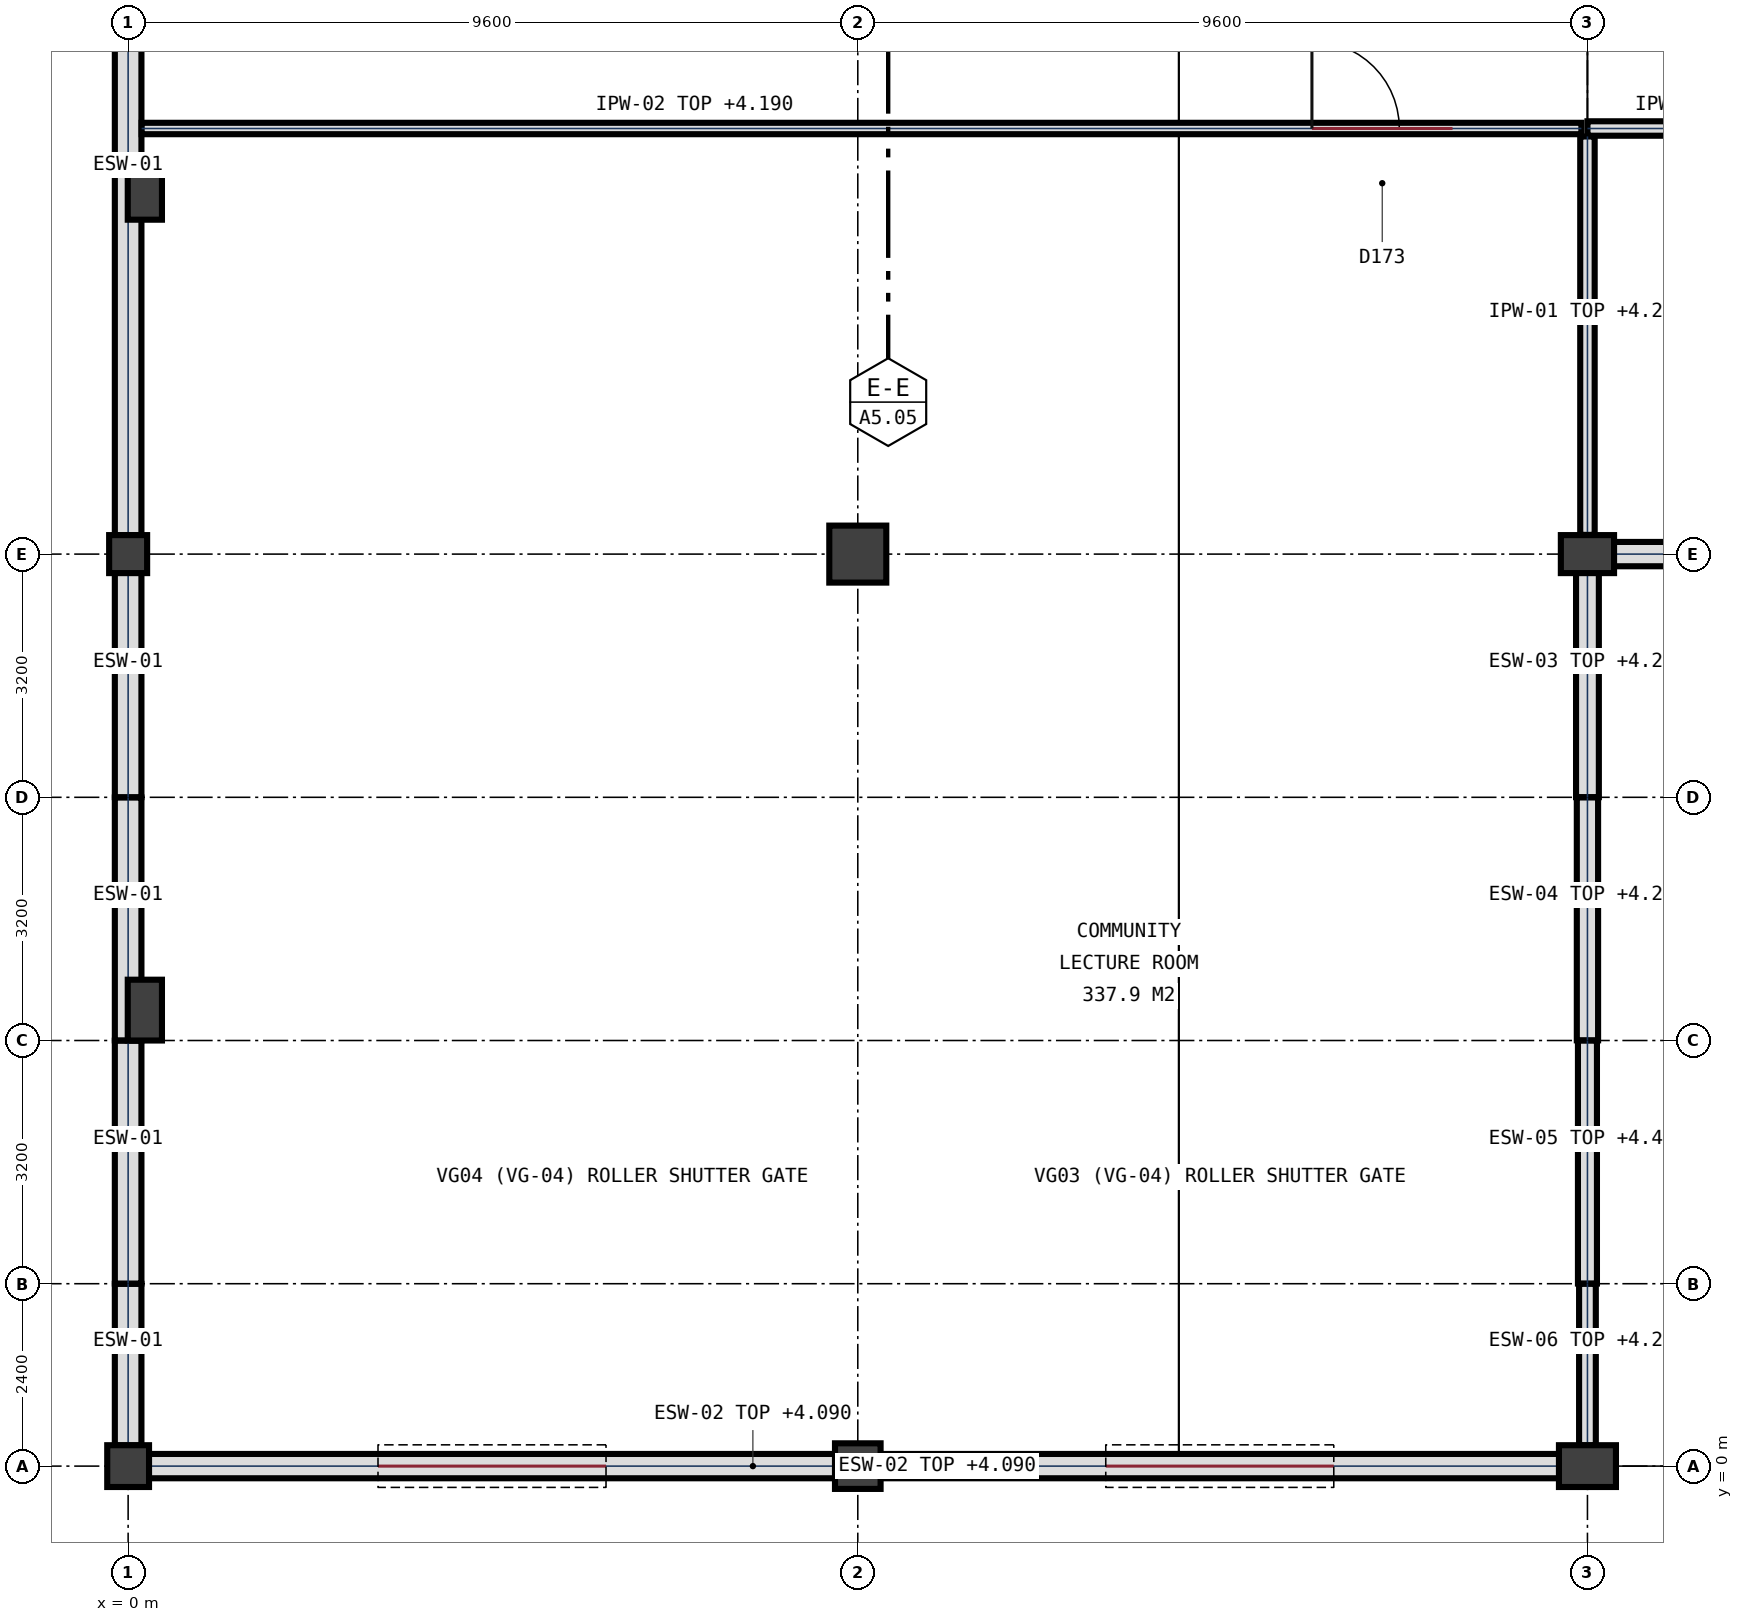
"""IFC4 building model, lengths in metres.
Left out: names, types, materials, properties, quantities, classifications, styles, units other than length and angle.
Written with IfcOpenShell. Run it as: python <this file> out.ifc"""

import sys

from ifc_helpers import new_model, si_unit, direction, frame, frame_2d, origin, origin_with_axes, origin_2d, place, context, subcontext, project, spatial, rectangle, circle, extrude, element, fill, save


model = new_model("IFC4")
c1 = context("Model", 3, precision=1e-05, world=origin(), true_north=direction((0.0, 1.0)))
c2 = subcontext(c1, "Body", "Model", "MODEL_VIEW")
j1 = project(units=[si_unit("LENGTHUNIT", "METRE"), si_unit("PLANEANGLEUNIT", "RADIAN")], contexts=[c1])
p1 = place(None, origin())
s1 = spatial("IfcSite", under=j1, at=p1, CompositionType="ELEMENT")
p2 = place(p1, origin())
s2 = spatial("IfcBuilding", under=s1, at=p2, CompositionType="ELEMENT")
p3 = place(p2, origin())
s3 = spatial("IfcBuildingStorey", under=s2, at=p3, CompositionType="ELEMENT", Elevation=0.0)
p4 = place(p3, origin_with_axes())
e1 = element("IfcColumn", 1, at=p4, inside=s3, PredefinedType="COLUMN", context=c2, shape_type="SweptSolid", body=[
    extrude(rectangle(XDim=0.55, YDim=0.55, at=origin_2d()), origin(), (0.0, 0.0, 1.0), 5.4),
])
p5 = place(p3, frame((0.0, 12.0, 0.0), z_axis=(0.0, 0.0, 1.0), x_axis=(1.0, 0.0, 0.0)))
e2 = element("IfcColumn", 2, at=p5, inside=s3, PredefinedType="COLUMN", context=c2, shape_type="SweptSolid", body=[
    extrude(rectangle(XDim=0.5, YDim=0.5, at=origin_2d()), origin(), (0.0, 0.0, 1.0), 5.4),
])
p6 = place(p3, frame((9.6, 0.0, 0.0), z_axis=(0.0, 0.0, 1.0), x_axis=(1.0, 0.0, 0.0)))
e3 = element("IfcColumn", 3, at=p6, inside=s3, PredefinedType="COLUMN", context=c2, shape_type="SweptSolid", body=[
    extrude(circle(Radius=0.3, at=origin_2d()), origin(), (0.0, 0.0, 1.0), 5.4),
])
p7 = place(p3, frame((9.6, 12.0, 0.0), z_axis=(0.0, 0.0, 1.0), x_axis=(1.0, 0.0, 0.0)))
e4 = element("IfcColumn", 4, at=p7, inside=s3, PredefinedType="COLUMN", context=c2, shape_type="SweptSolid", body=[
    extrude(rectangle(XDim=0.75, YDim=0.75, at=origin_2d()), origin(), (0.0, 0.0, 1.0), 5.4),
])
p8 = place(p3, frame((19.2, 0.0, 0.0), z_axis=(0.0, 0.0, 1.0), x_axis=(1.0, 0.0, 0.0)))
e5 = element("IfcColumn", 5, at=p8, inside=s3, PredefinedType="COLUMN", context=c2, shape_type="SweptSolid", body=[
    extrude(rectangle(XDim=0.75, YDim=0.55, at=origin_2d()), origin(), (0.0, 0.0, 1.0), 5.4),
])
p9 = place(p3, frame((19.2, 12.0, 0.0), z_axis=(0.0, 0.0, 1.0), x_axis=(1.0, 0.0, 0.0)))
e6 = element("IfcColumn", 6, at=p9, inside=s3, PredefinedType="COLUMN", context=c2, shape_type="SweptSolid", body=[
    extrude(rectangle(XDim=0.7, YDim=0.5, at=origin_2d()), origin(), (0.0, 0.0, 1.0), 5.4),
])
for number, where, z_axis, x_axis in (
    (7, (0.22, 6.0, 0.0), (0.0, 0.0, 1.0), (1.0, 0.0, 0.0)),
    (8, (0.22, 16.8, 0.0), (0.0, 0.0, 1.0), (1.0, 0.0, 0.0)),
):
    element("IfcColumn", number, at=place(p3, frame(where, z_axis=z_axis, x_axis=x_axis)), inside=s3, PredefinedType="PILASTER", context=c2, shape_type="SweptSolid", body=[
        extrude(rectangle(XDim=0.45, YDim=0.8, at=origin_2d()), origin(), (0.0, 0.0, 1.0), 5.4),
    ])
p10 = place(p3, frame((32.327, 12.0, 0.0), z_axis=(0.0, 0.0, 1.0), x_axis=(-1.0, 0.0, 0.0)))
e9 = element("IfcWall", 9, at=p10, inside=s3, PredefinedType="SOLIDWALL", context=c2, shape_type="SweptSolid", body=[
    extrude(rectangle(XDim=12.779, YDim=0.32, at=frame_2d((6.389, 0.0))), origin(), (0.0, 0.0, 1.0), 4.07),
])
p11 = place(p10, frame((9.552, 0.0, 0.0)))
e10 = element("IfcOpeningElement", 10, at=p11, cuts=e9, PredefinedType="OPENING", context=c2, shape_type="SweptSolid", body=[
    extrude(rectangle(XDim=1.15, YDim=2.15, at=frame_2d((0.575, 1.075))), frame((0.0, 0.17, 0.0), z_axis=(0.0, -1.0, 0.0), x_axis=(1.0, 0.0, 0.0)), (0.0, 0.0, 1.0), 0.34),
])
p12 = place(p10, frame((0.477, 0.0, 0.0)))
e11 = element("IfcOpeningElement", 11, at=p12, cuts=e9, PredefinedType="OPENING", context=c2, shape_type="SweptSolid", body=[
    extrude(rectangle(XDim=2.0, YDim=2.35, at=frame_2d((1.0, 1.175))), frame((0.0, 0.17, 0.0), z_axis=(0.0, -1.0, 0.0), x_axis=(1.0, 0.0, 0.0)), (0.0, 0.0, 1.0), 0.34),
])
p13 = place(p3, frame((19.2, 11.752, 0.0), z_axis=(0.0, 0.0, 1.0), x_axis=(0.0, -1.0, 0.0)))
e12 = element("IfcWall", 12, at=p13, inside=s3, PredefinedType="SOLIDWALL", context=c2, shape_type="SweptSolid", body=[
    extrude(rectangle(XDim=2.95, YDim=0.3, at=frame_2d((1.475, 0.0))), origin(), (0.0, 0.0, 1.0), 4.22),
])
p14 = place(p3, frame((19.2, 8.798, 0.0), z_axis=(0.0, 0.0, 1.0), x_axis=(0.0, -1.0, 0.0)))
e13 = element("IfcWall", 13, at=p14, inside=s3, PredefinedType="SOLIDWALL", context=c2, shape_type="SweptSolid", body=[
    extrude(rectangle(XDim=3.196, YDim=0.28, at=frame_2d((1.598, 0.0))), origin(), (0.0, 0.0, 1.0), 4.25),
])
p15 = place(p3, frame((19.2, 5.598, 0.0), z_axis=(0.0, 0.0, 1.0), x_axis=(0.0, -1.0, 0.0)))
e14 = element("IfcWall", 14, at=p15, inside=s3, PredefinedType="SOLIDWALL", context=c2, shape_type="SweptSolid", body=[
    extrude(rectangle(XDim=3.196, YDim=0.25, at=frame_2d((1.598, 0.0))), origin(), (0.0, 0.0, 1.0), 4.47),
])
p16 = place(p3, frame((19.2, 2.398, 0.0), z_axis=(0.0, 0.0, 1.0), x_axis=(0.0, -1.0, 0.0)))
e15 = element("IfcWall", 15, at=p16, inside=s3, PredefinedType="SOLIDWALL", context=c2, shape_type="SweptSolid", body=[
    extrude(rectangle(XDim=2.125, YDim=0.22, at=frame_2d((1.062, 0.0))), origin(), (0.0, 0.0, 1.0), 4.29),
])
p17 = place(p3, frame((18.827, 0.0, 0.0), z_axis=(0.0, 0.0, 1.0), x_axis=(-1.0, 0.0, 0.0)))
e16 = element("IfcWall", 16, at=p17, inside=s3, PredefinedType="SOLIDWALL", context=c2, shape_type="SweptSolid", body=[
    extrude(rectangle(XDim=8.929, YDim=0.32, at=frame_2d((4.464, 0.0))), origin(), (0.0, 0.0, 1.0), 4.09),
])
p18 = place(p17, frame((2.965, 0.0, 0.0)))
e17 = element("IfcOpeningElement", 17, at=p18, cuts=e16, PredefinedType="OPENING", context=c2, shape_type="SweptSolid", body=[
    extrude(rectangle(XDim=3.0, YDim=2.85, at=frame_2d((1.5, 1.425))), frame((0.0, 0.17, 0.0), z_axis=(0.0, -1.0, 0.0), x_axis=(1.0, 0.0, 0.0)), (0.0, 0.0, 1.0), 0.34),
])
p19 = place(p3, frame((9.302, 0.0, 0.0), z_axis=(0.0, 0.0, 1.0), x_axis=(-1.0, 0.0, 0.0)))
e18 = element("IfcWall", 18, at=p19, inside=s3, PredefinedType="SOLIDWALL", context=c2, shape_type="SweptSolid", body=[
    extrude(rectangle(XDim=9.029, YDim=0.32, at=frame_2d((4.515, 0.0))), origin(), (0.0, 0.0, 1.0), 4.09),
])
p20 = place(p19, frame((3.014, 0.0, 0.0)))
e19 = element("IfcOpeningElement", 19, at=p20, cuts=e18, PredefinedType="OPENING", context=c2, shape_type="SweptSolid", body=[
    extrude(rectangle(XDim=3.0, YDim=2.85, at=frame_2d((1.5, 1.425))), frame((0.0, 0.17, 0.0), z_axis=(0.0, -1.0, 0.0), x_axis=(1.0, 0.0, 0.0)), (0.0, 0.0, 1.0), 0.34),
])
p21 = place(p3, frame((0.0, 0.273, 0.0), z_axis=(0.0, 0.0, 1.0), x_axis=(0.0, 1.0, 0.0)))
e20 = element("IfcWall", 20, at=p21, inside=s3, PredefinedType="SOLIDWALL", context=c2, shape_type="SweptSolid", body=[
    extrude(rectangle(XDim=2.125, YDim=0.35, at=frame_2d((1.062, 0.0))), origin(), (0.0, 0.0, 1.0), 5.1),
])
p22 = place(p3, frame((0.0, 2.402, 0.0), z_axis=(0.0, 0.0, 1.0), x_axis=(0.0, 1.0, 0.0)))
e21 = element("IfcWall", 21, at=p22, inside=s3, PredefinedType="SOLIDWALL", context=c2, shape_type="SweptSolid", body=[
    extrude(rectangle(XDim=3.196, YDim=0.35, at=frame_2d((1.598, 0.0))), origin(), (0.0, 0.0, 1.0), 5.1),
])
p23 = place(p3, frame((0.0, 5.602, 0.0), z_axis=(0.0, 0.0, 1.0), x_axis=(0.0, 1.0, 0.0)))
e22 = element("IfcWall", 22, at=p23, inside=s3, PredefinedType="SOLIDWALL", context=c2, shape_type="SweptSolid", body=[
    extrude(rectangle(XDim=3.196, YDim=0.35, at=frame_2d((1.598, 0.0))), origin(), (0.0, 0.0, 1.0), 5.1),
])
p24 = place(p3, frame((0.0, 8.802, 0.0), z_axis=(0.0, 0.0, 1.0), x_axis=(0.0, 1.0, 0.0)))
e23 = element("IfcWall", 23, at=p24, inside=s3, PredefinedType="SOLIDWALL", context=c2, shape_type="SweptSolid", body=[
    extrude(rectangle(XDim=2.95, YDim=0.35, at=frame_2d((1.475, 0.0))), origin(), (0.0, 0.0, 1.0), 5.1),
])
p25 = place(p3, frame((0.0, 12.248, 0.0), z_axis=(0.0, 0.0, 1.0), x_axis=(0.0, 1.0, 0.0)))
e24 = element("IfcWall", 24, at=p25, inside=s3, PredefinedType="SOLIDWALL", context=c2, shape_type="SweptSolid", body=[
    extrude(rectangle(XDim=9.129, YDim=0.35, at=frame_2d((4.564, 0.0))), origin(), (0.0, 0.0, 1.0), 5.1),
])
p26 = place(p3, frame((19.2, 17.6, 0.0), z_axis=(0.0, 0.0, 1.0), x_axis=(1.0, 0.0, 0.0)))
e25 = element("IfcWall", 25, at=p26, inside=s3, PredefinedType="PARTITIONING", context=c2, shape_type="SweptSolid", body=[
    extrude(rectangle(XDim=10.35, YDim=0.19, at=frame_2d((5.175, 0.0))), origin(), (0.0, 0.0, 1.0), 4.22),
])
p27 = place(p26, frame((4.7, 0.0, 0.0)))
e26 = element("IfcOpeningElement", 26, at=p27, cuts=e25, PredefinedType="OPENING", context=c2, shape_type="SweptSolid", body=[
    extrude(rectangle(XDim=1.2, YDim=2.2, at=frame_2d((0.6, 1.1))), frame((0.0, 0.105, 0.0), z_axis=(0.0, -1.0, 0.0), x_axis=(1.0, 0.0, 0.0)), (0.0, 0.0, 1.0), 0.21),
])
p28 = place(p3, frame((19.2, 12.253, 0.0), z_axis=(0.0, 0.0, 1.0), x_axis=(0.0, 1.0, 0.0)))
e27 = element("IfcWall", 27, at=p28, inside=s3, PredefinedType="PARTITIONING", context=c2, shape_type="SweptSolid", body=[
    extrude(rectangle(XDim=5.242, YDim=0.19, at=frame_2d((2.621, 0.0))), origin(), (0.0, 0.0, 1.0), 4.22),
])
p29 = place(p3, frame((0.178, 17.6, 0.0), z_axis=(0.0, 0.0, 1.0), x_axis=(1.0, 0.0, 0.0)))
e28 = element("IfcWall", 28, at=p29, inside=s3, PredefinedType="PARTITIONING", context=c2, shape_type="SweptSolid", body=[
    extrude(rectangle(XDim=18.942, YDim=0.15, at=frame_2d((9.471, 0.0))), origin(), (0.0, 0.0, 1.0), 4.19),
])
p30 = place(p29, frame((15.397, 0.0, 0.0)))
e29 = element("IfcOpeningElement", 29, at=p30, cuts=e28, PredefinedType="OPENING", context=c2, shape_type="SweptSolid", body=[
    extrude(rectangle(XDim=1.85, YDim=2.35, at=frame_2d((0.925, 1.175))), frame((0.0, 0.085, 0.0), z_axis=(0.0, -1.0, 0.0), x_axis=(1.0, 0.0, 0.0)), (0.0, 0.0, 1.0), 0.17),
])
p31 = place(p18, origin())
e30 = element("IfcDoor", 30, at=p31, inside=s3, OperationType="ROLLINGUP", PredefinedType="GATE", context=c2, shape_type="SweptSolid", body=[
    extrude(rectangle(XDim=3.0, YDim=2.85, at=frame_2d((1.5, 1.425))), frame((0.0, 0.032, 0.0), z_axis=(0.0, -1.0, 0.0), x_axis=(1.0, 0.0, 0.0)), (0.0, 0.0, 1.0), 0.065),
])
fill(e17, e30)
p32 = place(p20, origin())
e31 = element("IfcDoor", 31, at=p32, inside=s3, OperationType="ROLLINGUP", PredefinedType="GATE", context=c2, shape_type="SweptSolid", body=[
    extrude(rectangle(XDim=3.0, YDim=2.85, at=frame_2d((1.5, 1.425))), frame((0.0, 0.032, 0.0), z_axis=(0.0, -1.0, 0.0), x_axis=(1.0, 0.0, 0.0)), (0.0, 0.0, 1.0), 0.065),
])
fill(e19, e31)
p33 = place(p30, origin())
e32 = element("IfcDoor", 32, at=p33, inside=s3, OperationType="SINGLE_SWING_LEFT", PredefinedType="DOOR", context=c2, shape_type="SweptSolid", body=[
    extrude(rectangle(XDim=1.85, YDim=2.35, at=frame_2d((0.925, 1.175))), frame((0.0, 0.032, 0.0), z_axis=(0.0, -1.0, 0.0), x_axis=(1.0, 0.0, 0.0)), (0.0, 0.0, 1.0), 0.065),
])
fill(e29, e32)
save(model, sys.argv[1])
